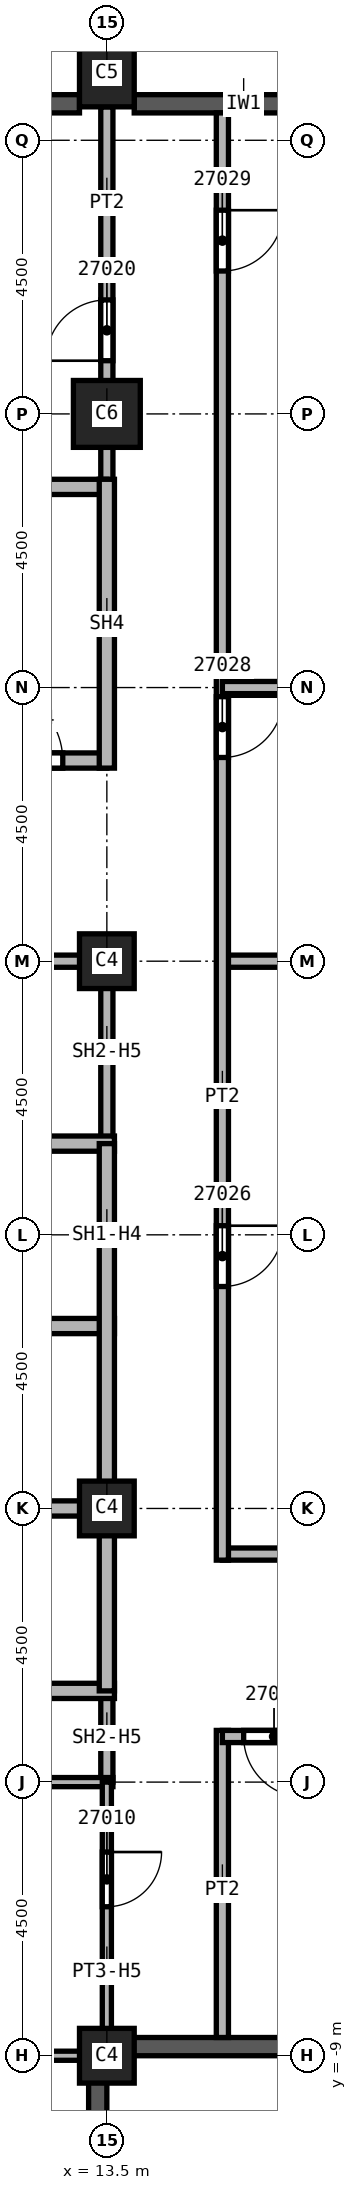
"""IFC4 building model, lengths in metres.
Left out: names, types, materials, properties, quantities, classifications, styles, units other than length and angle.
Written with IfcOpenShell. Run it as: python <this file> out.ifc"""

import sys

from ifc_helpers import new_model, si_unit, direction, frame, frame_2d, origin, origin_2d, place, context, subcontext, project, spatial, rectangle, extrude, element, fill, save


model = new_model("IFC4")
c1 = context("Model", 3, precision=1e-05, world=origin(), true_north=direction((0.0, 1.0)))
c2 = subcontext(c1, "Body", "Model", "MODEL_VIEW")
j1 = project(units=[si_unit("LENGTHUNIT", "METRE"), si_unit("PLANEANGLEUNIT", "RADIAN")], contexts=[c1])
p1 = place(None, origin())
s1 = spatial("IfcSite", under=j1, at=p1, CompositionType="ELEMENT")
p2 = place(p1, origin())
s2 = spatial("IfcBuilding", under=s1, at=p2, CompositionType="ELEMENT")
p3 = place(p2, frame((0.0, 0.0, 178.0)))
s3 = spatial("IfcBuildingStorey", under=s2, at=p3, CompositionType="ELEMENT", Elevation=178.0)
p4 = place(p3, frame((13.5, 18.0, 0.0), z_axis=(0.0, 0.0, 1.0), x_axis=(1.0, 0.0, 0.0)))
e1 = element("IfcColumn", 1, at=p4, inside=s3, PredefinedType="COLUMN", context=c2, shape_type="SweptSolid", body=[
    extrude(rectangle(XDim=1.1, YDim=1.1, at=origin_2d()), origin(), (0.0, 0.0, 1.0), 5.72),
])
for number, where, z_axis, x_axis in (
    (2, (13.5, 0.0, 0.0), (0.0, 0.0, 1.0), (1.0, 0.0, 0.0)),
    (3, (13.5, 9.0, 0.0), (0.0, 0.0, 1.0), (1.0, 0.0, 0.0)),
    (4, (13.5, -9.0, 0.0), (0.0, 0.0, 1.0), (1.0, 0.0, 0.0)),
):
    element("IfcColumn", number, at=place(p3, frame(where, z_axis=z_axis, x_axis=x_axis)), inside=s3, PredefinedType="COLUMN", context=c2, shape_type="SweptSolid", body=[
        extrude(rectangle(XDim=0.9, YDim=0.9, at=origin_2d()), origin(), (0.0, 0.0, 1.0), 5.72),
    ])
p5 = place(p3, frame((13.5, 23.6, 0.0), z_axis=(0.0, -0.138520981641, 0.990359499195), x_axis=(1.0, 0.0, 0.0)))
e5 = element("IfcColumn", 5, at=p5, inside=s3, PredefinedType="COLUMN", context=c2, shape_type="SweptSolid", body=[
    extrude(rectangle(XDim=0.9, YDim=1.1, at=origin_2d()), origin(), (0.0, 0.0, 1.0), 5.776),
])
for number, where, z_axis, x_axis in (
    (6, (17.55, 23.1, 0.0), (0.0, 0.0, 1.0), (-1.0, 0.0, 0.0)),
    (7, (13.05, 23.1, 0.0), (0.0, 0.0, 1.0), (-1.0, 0.0, 0.0)),
):
    element("IfcWall", number, at=place(p3, frame(where, z_axis=z_axis, x_axis=x_axis)), inside=s3, PredefinedType="SOLIDWALL", context=c2, shape_type="SweptSolid", body=[
        extrude(rectangle(XDim=3.6, YDim=0.3, at=frame_2d((1.8, 0.0))), origin(), (0.0, 0.0, 1.0), 5.12),
    ])
p6 = place(p3, frame((13.35, -9.025, 0.0), z_axis=(0.0, 0.0, 1.0), x_axis=(0.0, -1.0, 0.0)))
e8 = element("IfcWall", 8, at=p6, inside=s3, PredefinedType="SOLIDWALL", context=c2, shape_type="SweptSolid", body=[
    extrude(rectangle(XDim=8.425, YDim=0.3, at=frame_2d((4.212, 0.0))), origin(), (0.0, 0.0, 1.0), 5.12),
])
p7 = place(p6, frame((2.975, 0.0, 0.0)))
e9 = element("IfcOpeningElement", 9, at=p7, cuts=e8, PredefinedType="OPENING", context=c2, shape_type="SweptSolid", body=[
    extrude(rectangle(XDim=1.2, YDim=2.4, at=frame_2d((0.6, 1.2))), frame((0.0, 0.15, 0.0), z_axis=(0.0, -1.0, 0.0), x_axis=(1.0, 0.0, 0.0)), (0.0, 0.0, 1.0), 0.3),
])
p8 = place(p3, frame((13.525, -8.85, 0.0), z_axis=(0.0, 0.0, 1.0), x_axis=(1.0, 0.0, 0.0)))
e10 = element("IfcWall", 10, at=p8, inside=s3, PredefinedType="SOLIDWALL", context=c2, shape_type="SweptSolid", body=[
    extrude(rectangle(XDim=8.425, YDim=0.3, at=frame_2d((4.212, 0.0))), origin(), (0.0, 0.0, 1.0), 5.12),
])
p9 = place(p3, frame((13.5, 16.675, 0.0), z_axis=(0.0, 0.0, 1.0), x_axis=(0.0, 1.0, 0.0)))
e11 = element("IfcWall", 11, at=p9, inside=s3, PredefinedType="PARTITIONING", context=c2, shape_type="SweptSolid", body=[
    extrude(rectangle(XDim=6.375, YDim=0.2, at=frame_2d((3.188, 0.0))), origin(), (0.0, 0.0, 1.0), 5.72),
])
p10 = place(p9, frame((2.2, 0.0, 0.0)))
e12 = element("IfcOpeningElement", 12, at=p10, cuts=e11, PredefinedType="OPENING", context=c2, shape_type="SweptSolid", body=[
    extrude(rectangle(XDim=1.0, YDim=2.1, at=frame_2d((0.5, 1.05))), frame((0.0, 0.1, 0.0), z_axis=(0.0, -1.0, 0.0), x_axis=(1.0, 0.0, 0.0)), (0.0, 0.0, 1.0), 0.2),
])
p11 = place(p3, frame((15.4, -3.65, 0.0), z_axis=(0.0, 0.0, 1.0), x_axis=(0.0, -1.0, 0.0)))
e13 = element("IfcWall", 13, at=p11, inside=s3, PredefinedType="PARTITIONING", context=c2, shape_type="SweptSolid", body=[
    extrude(rectangle(XDim=5.05, YDim=0.2, at=frame_2d((2.525, 0.0))), origin(), (0.0, 0.0, 1.0), 5.72),
])
p12 = place(p3, frame((15.4, -0.75, 0.0), z_axis=(0.0, 0.0, 1.0), x_axis=(1.0, 0.0, 0.0)))
e14 = element("IfcWall", 14, at=p12, inside=s3, PredefinedType="PARTITIONING", context=c2, shape_type="SweptSolid", body=[
    extrude(rectangle(XDim=18.45, YDim=0.2, at=frame_2d((9.225, 0.0))), origin(), (0.0, 0.0, 1.0), 5.72),
])
p13 = place(p12, frame((12.35, 0.0, 0.0)))
e15 = element("IfcOpeningElement", 15, at=p13, cuts=e14, PredefinedType="OPENING", context=c2, shape_type="SweptSolid", body=[
    extrude(rectangle(XDim=1.0, YDim=2.1, at=frame_2d((0.5, 1.05))), frame((0.0, 0.1, 0.0), z_axis=(0.0, -1.0, 0.0), x_axis=(1.0, 0.0, 0.0)), (0.0, 0.0, 1.0), 0.2),
])
p14 = place(p3, frame((15.4, 9.0, 0.0), z_axis=(0.0, 0.0, 1.0), x_axis=(1.0, 0.0, 0.0)))
e16 = element("IfcWall", 16, at=p14, inside=s3, PredefinedType="PARTITIONING", context=c2, shape_type="SweptSolid", body=[
    extrude(rectangle(XDim=11.7, YDim=0.2, at=frame_2d((5.85, 0.0))), origin(), (0.0, 0.0, 1.0), 5.72),
])
p15 = place(p3, frame((15.4, 22.95, 0.0), z_axis=(0.0, 0.0, 1.0), x_axis=(0.0, -1.0, 0.0)))
e17 = element("IfcWall", 17, at=p15, inside=s3, PredefinedType="PARTITIONING", context=c2, shape_type="SweptSolid", body=[
    extrude(rectangle(XDim=23.8, YDim=0.2, at=frame_2d((11.9, 0.0))), origin(), (0.0, 0.0, 1.0), 5.72),
])
p16 = place(p15, frame((18.3, 0.0, 0.0)))
e18 = element("IfcOpeningElement", 18, at=p16, cuts=e17, PredefinedType="OPENING", context=c2, shape_type="SweptSolid", body=[
    extrude(rectangle(XDim=1.0, YDim=2.1, at=frame_2d((0.5, 1.05))), frame((0.0, 0.1, 0.0), z_axis=(0.0, -1.0, 0.0), x_axis=(1.0, 0.0, 0.0)), (0.0, 0.0, 1.0), 0.2),
])
p17 = place(p15, frame((9.6, 0.0, 0.0)))
e19 = element("IfcOpeningElement", 19, at=p17, cuts=e17, PredefinedType="OPENING", context=c2, shape_type="SweptSolid", body=[
    extrude(rectangle(XDim=1.0, YDim=2.1, at=frame_2d((0.5, 1.05))), frame((0.0, 0.1, 0.0), z_axis=(0.0, -1.0, 0.0), x_axis=(1.0, 0.0, 0.0)), (0.0, 0.0, 1.0), 0.2),
])
p18 = place(p15, frame((1.6, 0.0, 0.0)))
e20 = element("IfcOpeningElement", 20, at=p18, cuts=e17, PredefinedType="OPENING", context=c2, shape_type="SweptSolid", body=[
    extrude(rectangle(XDim=1.0, YDim=2.1, at=frame_2d((0.5, 1.05))), frame((0.0, 0.1, 0.0), z_axis=(0.0, -1.0, 0.0), x_axis=(1.0, 0.0, 0.0)), (0.0, 0.0, 1.0), 0.2),
])
p19 = place(p3, frame((15.4, 13.5, 0.0), z_axis=(0.0, 0.0, 1.0), x_axis=(1.0, 0.0, 0.0)))
e21 = element("IfcWall", 21, at=p19, inside=s3, PredefinedType="PARTITIONING", context=c2, shape_type="SweptSolid", body=[
    extrude(rectangle(XDim=11.7, YDim=0.2, at=frame_2d((5.85, 0.0))), origin(), (0.0, 0.0, 1.0), 5.72),
])
p20 = place(p3, frame((33.85, -3.75, 0.0), z_axis=(0.0, 0.0, 1.0), x_axis=(-1.0, 0.0, 0.0)))
e22 = element("IfcWall", 22, at=p20, inside=s3, PredefinedType="PARTITIONING", context=c2, shape_type="SweptSolid", body=[
    extrude(rectangle(XDim=18.45, YDim=0.2, at=frame_2d((9.225, 0.0))), origin(), (0.0, 0.0, 1.0), 5.72),
])
p21 = place(p20, frame((17.1, 0.0, 0.0)))
e23 = element("IfcOpeningElement", 23, at=p21, cuts=e22, PredefinedType="OPENING", context=c2, shape_type="SweptSolid", body=[
    extrude(rectangle(XDim=1.0, YDim=2.1, at=frame_2d((0.5, 1.05))), frame((0.0, 0.1, 0.0), z_axis=(0.0, -1.0, 0.0), x_axis=(1.0, 0.0, 0.0)), (0.0, 0.0, 1.0), 0.2),
])
p22 = place(p20, frame((5.65, 0.0, 0.0)))
e24 = element("IfcOpeningElement", 24, at=p22, cuts=e22, PredefinedType="OPENING", context=c2, shape_type="SweptSolid", body=[
    extrude(rectangle(XDim=1.0, YDim=2.1, at=frame_2d((0.5, 1.05))), frame((0.0, 0.1, 0.0), z_axis=(0.0, -1.0, 0.0), x_axis=(1.0, 0.0, 0.0)), (0.0, 0.0, 1.0), 0.2),
])
p23 = place(p3, frame((10.5, 9.0, 0.0), z_axis=(0.0, 0.0, 1.0), x_axis=(1.0, 0.0, 0.0)))
e25 = element("IfcWall", 25, at=p23, inside=s3, PredefinedType="SOLIDWALL", context=c2, shape_type="SweptSolid", body=[
    extrude(rectangle(XDim=3.0, YDim=0.2, at=frame_2d((1.5, 0.0))), origin(), (0.0, 0.0, 1.0), 4.958),
])
p24 = place(p3, frame((13.5, -3.0, 0.0), z_axis=(0.0, 0.0, 1.0), x_axis=(0.0, -1.0, 0.0)))
e26 = element("IfcWall", 26, at=p24, inside=s3, PredefinedType="SOLIDWALL", context=c2, shape_type="SweptSolid", body=[
    extrude(rectangle(XDim=1.5, YDim=0.2, at=frame_2d((0.75, 0.0))), origin(), (0.0, 0.0, 1.0), 4.958),
])
p25 = place(p3, frame((13.5, 9.1, 0.0), z_axis=(0.0, 0.0, 1.0), x_axis=(0.0, -1.0, 0.0)))
e27 = element("IfcWall", 27, at=p25, inside=s3, PredefinedType="SOLIDWALL", context=c2, shape_type="SweptSolid", body=[
    extrude(rectangle(XDim=3.1, YDim=0.2, at=frame_2d((1.55, 0.0))), origin(), (0.0, 0.0, 1.0), 4.958),
])
p26 = place(p3, frame((4.375, -3.0, 0.0), z_axis=(0.0, 0.0, 1.0), x_axis=(1.0, 0.0, 0.0)))
e28 = element("IfcWall", 28, at=p26, inside=s3, PredefinedType="SOLIDWALL", context=c2, shape_type="SweptSolid", body=[
    extrude(rectangle(XDim=9.25, YDim=0.25, at=frame_2d((4.625, 0.0))), origin(), (0.0, 0.0, 1.0), 5.72),
])
p27 = place(p26, frame((4.875, 0.0, 0.0)))
e29 = element("IfcOpeningElement", 29, at=p27, cuts=e28, PredefinedType="OPENING", context=c2, shape_type="SweptSolid", body=[
    extrude(rectangle(XDim=1.1, YDim=2.1, at=frame_2d((0.55, 1.05))), frame((0.0, 0.125, 0.0), z_axis=(0.0, -1.0, 0.0), x_axis=(1.0, 0.0, 0.0)), (0.0, 0.0, 1.0), 0.25),
])
p28 = place(p3, frame((4.375, 3.0, 0.0), z_axis=(0.0, 0.0, 1.0), x_axis=(1.0, 0.0, 0.0)))
e30 = element("IfcWall", 30, at=p28, inside=s3, PredefinedType="SOLIDWALL", context=c2, shape_type="SweptSolid", body=[
    extrude(rectangle(XDim=9.25, YDim=0.25, at=frame_2d((4.625, 0.0))), origin(), (0.0, 0.0, 1.0), 5.72),
])
p29 = place(p28, frame((4.875, 0.0, 0.0)))
e31 = element("IfcOpeningElement", 31, at=p29, cuts=e30, PredefinedType="OPENING", context=c2, shape_type="SweptSolid", body=[
    extrude(rectangle(XDim=1.1, YDim=2.1, at=frame_2d((0.55, 1.05))), frame((0.0, 0.125, 0.0), z_axis=(0.0, -1.0, 0.0), x_axis=(1.0, 0.0, 0.0)), (0.0, 0.0, 1.0), 0.25),
])
for number, where, z_axis, x_axis in (
    (32, (10.5, 0.0, 0.0), (0.0, 0.0, 1.0), (1.0, 0.0, 0.0)),
    (33, (10.5, 6.0, 0.0), (0.0, 0.0, 1.0), (1.0, 0.0, 0.0)),
):
    element("IfcWall", number, at=place(p3, frame(where, z_axis=z_axis, x_axis=x_axis)), inside=s3, PredefinedType="SOLIDWALL", context=c2, shape_type="SweptSolid", body=[
        extrude(rectangle(XDim=3.125, YDim=0.25, at=frame_2d((1.562, 0.0))), origin(), (0.0, 0.0, 1.0), 5.72),
    ])
p30 = place(p3, frame((13.5, 6.0, 0.0), z_axis=(0.0, 0.0, 1.0), x_axis=(0.0, -1.0, 0.0)))
e34 = element("IfcWall", 34, at=p30, inside=s3, PredefinedType="SOLIDWALL", context=c2, shape_type="SweptSolid", body=[
    extrude(rectangle(XDim=9.0, YDim=0.25, at=frame_2d((4.5, 0.0))), origin(), (0.0, 0.0, 1.0), 4.958),
])
p31 = place(p3, frame((4.375, 12.3, 0.0), z_axis=(0.0, 0.0, 1.0), x_axis=(1.0, 0.0, 0.0)))
e35 = element("IfcWall", 35, at=p31, inside=s3, PredefinedType="SOLIDWALL", context=c2, shape_type="SweptSolid", body=[
    extrude(rectangle(XDim=9.125, YDim=0.25, at=frame_2d((4.562, 0.0))), origin(), (0.0, 0.0, 1.0), 5.72),
])
p32 = place(p31, frame((7.2, 0.0, 0.0)))
e36 = element("IfcOpeningElement", 36, at=p32, cuts=e35, PredefinedType="OPENING", context=c2, shape_type="SweptSolid", body=[
    extrude(rectangle(XDim=1.2, YDim=2.1, at=frame_2d((0.6, 1.05))), frame((0.0, 0.125, 0.0), z_axis=(0.0, -1.0, 0.0), x_axis=(1.0, 0.0, 0.0)), (0.0, 0.0, 1.0), 0.25),
])
p33 = place(p3, frame((4.375, 16.8, 0.0), z_axis=(0.0, 0.0, 1.0), x_axis=(1.0, 0.0, 0.0)))
e37 = element("IfcWall", 37, at=p33, inside=s3, PredefinedType="SOLIDWALL", context=c2, shape_type="SweptSolid", body=[
    extrude(rectangle(XDim=9.125, YDim=0.25, at=frame_2d((4.562, 0.0))), origin(), (0.0, 0.0, 1.0), 5.72),
])
p34 = place(p3, frame((13.5, 12.175, 0.0), z_axis=(0.0, 0.0, 1.0), x_axis=(0.0, 1.0, 0.0)))
e38 = element("IfcWall", 38, at=p34, inside=s3, PredefinedType="SOLIDWALL", context=c2, shape_type="SweptSolid", body=[
    extrude(rectangle(XDim=4.75, YDim=0.25, at=frame_2d((2.375, 0.0))), origin(), (0.0, 0.0, 1.0), 5.72),
])
p35 = place(p3, frame((10.5, -4.5, 0.0), z_axis=(0.0, 0.0, 1.0), x_axis=(1.0, 0.0, 0.0)))
e39 = element("IfcWall", 39, at=p35, inside=s3, PredefinedType="PARTITIONING", context=c2, shape_type="SweptSolid", body=[
    extrude(rectangle(XDim=3.1, YDim=0.15, at=frame_2d((1.55, 0.0))), origin(), (0.0, 0.0, 1.0), 5.72),
])
p36 = place(p3, frame((13.5, -9.0, 0.0), z_axis=(0.0, 0.0, 1.0), x_axis=(-1.0, 0.0, 0.0)))
e40 = element("IfcWall", 40, at=p36, inside=s3, PredefinedType="PARTITIONING", context=c2, shape_type="SweptSolid", body=[
    extrude(rectangle(XDim=3.0, YDim=0.15, at=frame_2d((1.5, 0.0))), origin(), (0.0, 0.0, 1.0), 4.958),
])
p37 = place(p3, frame((13.5, -4.5, 0.0), z_axis=(0.0, 0.0, 1.0), x_axis=(0.0, -1.0, 0.0)))
e41 = element("IfcWall", 41, at=p37, inside=s3, PredefinedType="PARTITIONING", context=c2, shape_type="SweptSolid", body=[
    extrude(rectangle(XDim=4.525, YDim=0.15, at=frame_2d((2.262, 0.0))), origin(), (0.0, 0.0, 1.0), 4.958),
])
p38 = place(p37, frame((1.15, 0.0, 0.0)))
e42 = element("IfcOpeningElement", 42, at=p38, cuts=e41, PredefinedType="OPENING", context=c2, shape_type="SweptSolid", body=[
    extrude(rectangle(XDim=0.9, YDim=2.1, at=frame_2d((0.45, 1.05))), frame((0.0, 0.075, 0.0), z_axis=(0.0, -1.0, 0.0), x_axis=(1.0, 0.0, 0.0)), (0.0, 0.0, 1.0), 0.15),
])
p39 = place(p38, origin())
e43 = element("IfcDoor", 43, at=p39, inside=s3, OperationType="SINGLE_SWING_LEFT", PredefinedType="DOOR", context=c2, shape_type="SweptSolid", body=[
    extrude(rectangle(XDim=0.9, YDim=2.1, at=frame_2d((0.45, 1.05))), frame((0.0, 0.025, 0.0), z_axis=(0.0, -1.0, 0.0), x_axis=(1.0, 0.0, 0.0)), (0.0, 0.0, 1.0), 0.05),
])
fill(e42, e43)
p40 = place(p32, origin())
e44 = element("IfcDoor", 44, at=p40, inside=s3, OperationType="SINGLE_SWING_LEFT", PredefinedType="DOOR", context=c2, shape_type="SweptSolid", body=[
    extrude(rectangle(XDim=1.2, YDim=2.1, at=frame_2d((0.6, 1.05))), frame((0.0, 0.025, 0.0), z_axis=(0.0, -1.0, 0.0), x_axis=(1.0, 0.0, 0.0)), (0.0, 0.0, 1.0), 0.05),
])
fill(e36, e44)
p41 = place(p10, origin())
e45 = element("IfcDoor", 45, at=p41, inside=s3, OperationType="SINGLE_SWING_LEFT", PredefinedType="DOOR", context=c2, shape_type="SweptSolid", body=[
    extrude(rectangle(XDim=1.0, YDim=2.1, at=frame_2d((0.5, 1.05))), frame((0.0, 0.025, 0.0), z_axis=(0.0, -1.0, 0.0), x_axis=(1.0, 0.0, 0.0)), (0.0, 0.0, 1.0), 0.05),
])
fill(e12, e45)
p42 = place(p16, origin())
e46 = element("IfcDoor", 46, at=p42, inside=s3, OperationType="SINGLE_SWING_LEFT", PredefinedType="DOOR", context=c2, shape_type="SweptSolid", body=[
    extrude(rectangle(XDim=1.0, YDim=2.1, at=frame_2d((0.5, 1.05))), frame((0.0, 0.025, 0.0), z_axis=(0.0, -1.0, 0.0), x_axis=(1.0, 0.0, 0.0)), (0.0, 0.0, 1.0), 0.05),
])
fill(e18, e46)
p43 = place(p17, origin())
e47 = element("IfcDoor", 47, at=p43, inside=s3, OperationType="SINGLE_SWING_LEFT", PredefinedType="DOOR", context=c2, shape_type="SweptSolid", body=[
    extrude(rectangle(XDim=1.0, YDim=2.1, at=frame_2d((0.5, 1.05))), frame((0.0, 0.025, 0.0), z_axis=(0.0, -1.0, 0.0), x_axis=(1.0, 0.0, 0.0)), (0.0, 0.0, 1.0), 0.05),
])
fill(e19, e47)
p44 = place(p18, origin())
e48 = element("IfcDoor", 48, at=p44, inside=s3, OperationType="SINGLE_SWING_RIGHT", PredefinedType="DOOR", context=c2, shape_type="SweptSolid", body=[
    extrude(rectangle(XDim=1.0, YDim=2.1, at=frame_2d((0.5, 1.05))), frame((0.0, 0.025, 0.0), z_axis=(0.0, -1.0, 0.0), x_axis=(1.0, 0.0, 0.0)), (0.0, 0.0, 1.0), 0.05),
])
fill(e20, e48)
p45 = place(p21, origin())
e49 = element("IfcDoor", 49, at=p45, inside=s3, OperationType="SINGLE_SWING_LEFT", PredefinedType="DOOR", context=c2, shape_type="SweptSolid", body=[
    extrude(rectangle(XDim=1.0, YDim=2.1, at=frame_2d((0.5, 1.05))), frame((0.0, 0.025, 0.0), z_axis=(0.0, -1.0, 0.0), x_axis=(1.0, 0.0, 0.0)), (0.0, 0.0, 1.0), 0.05),
])
fill(e23, e49)
save(model, sys.argv[1])
